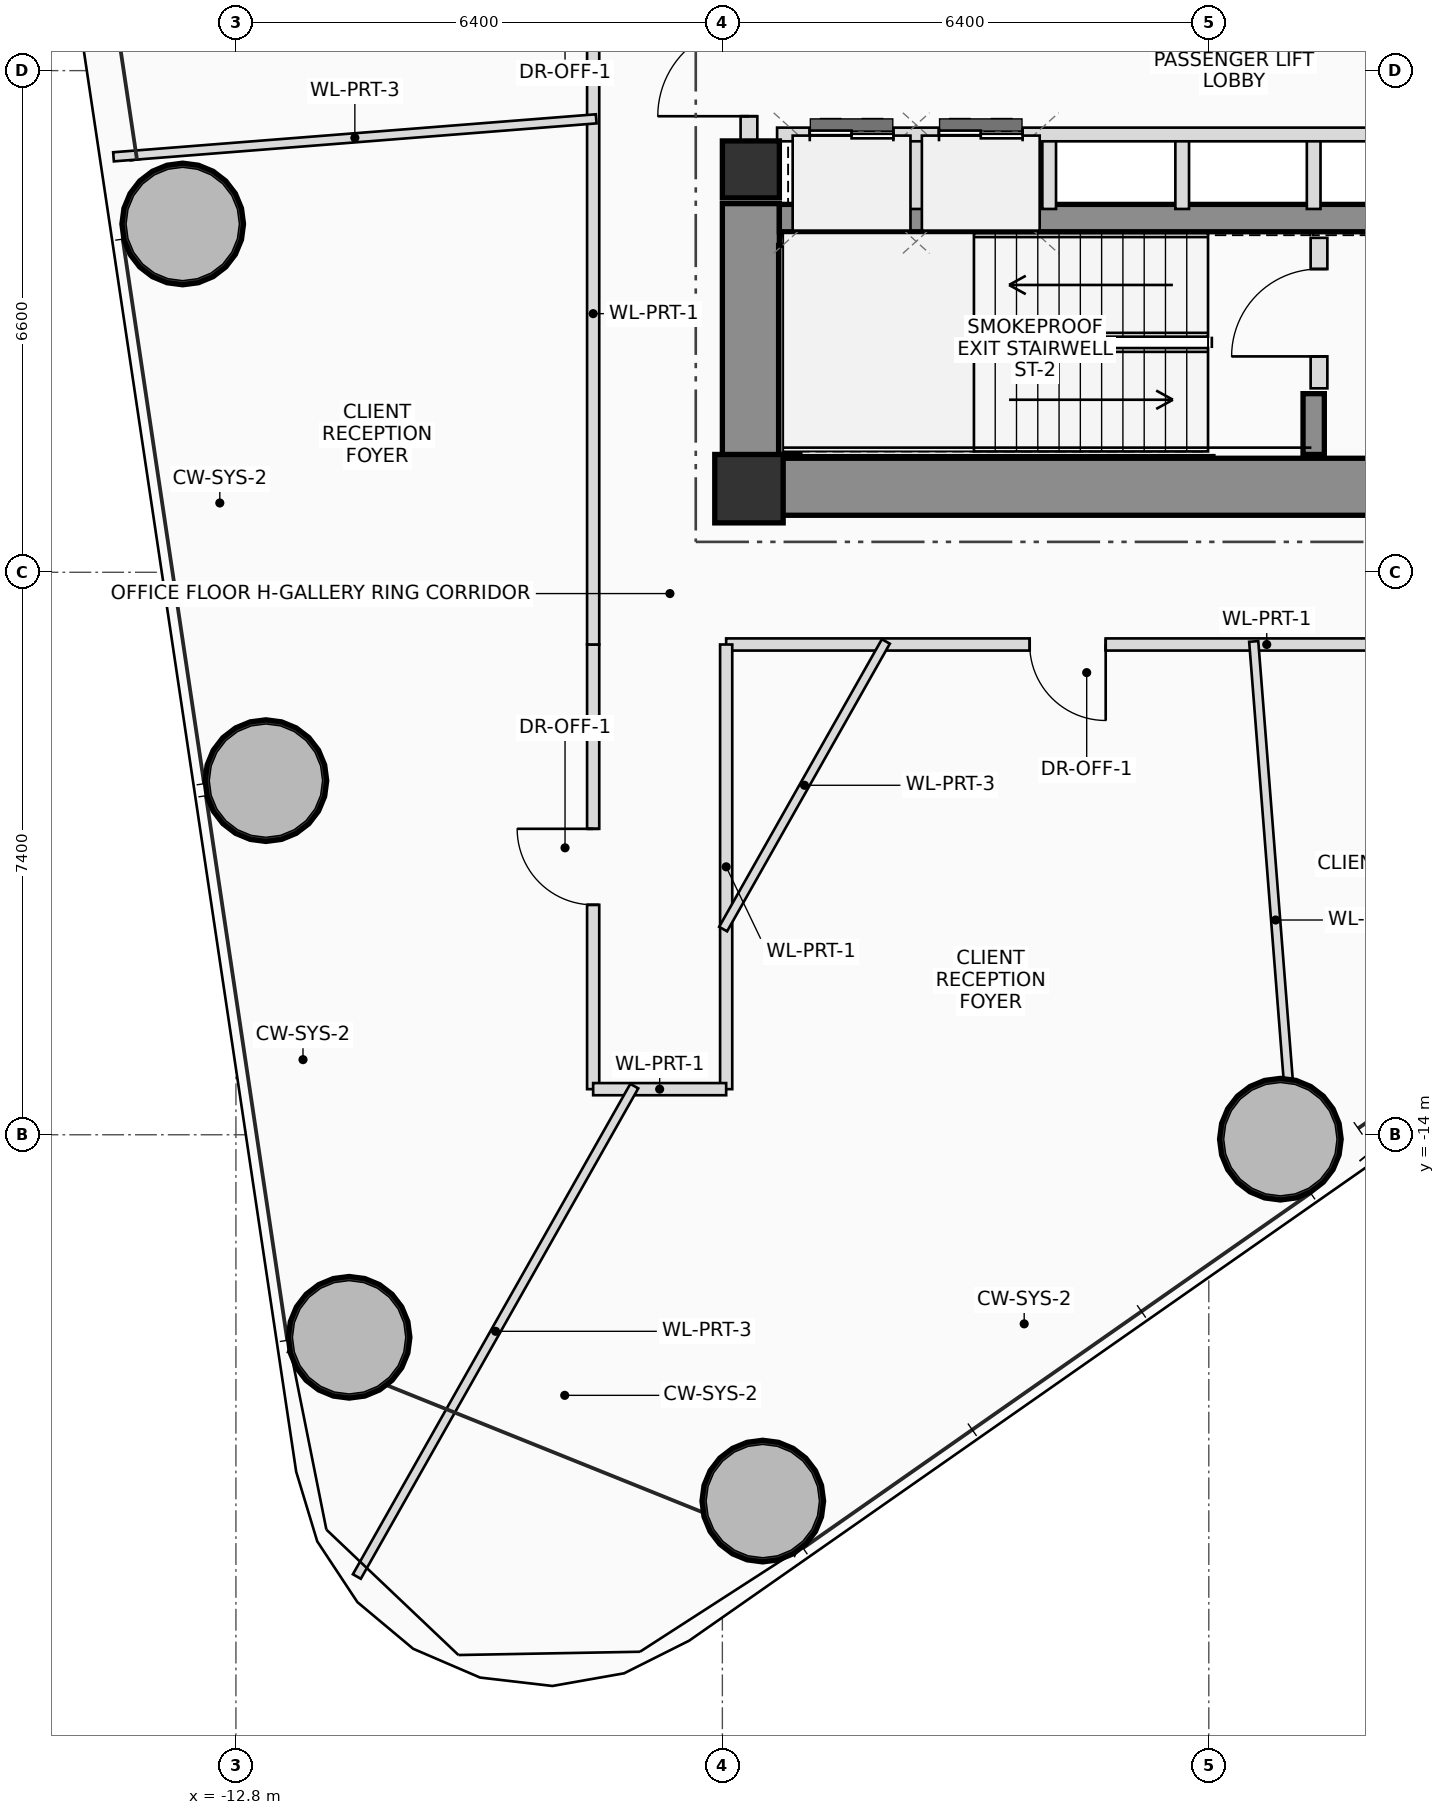
"""IFC4 building model, lengths in metres.
Left out: names, types, materials, properties, quantities, classifications, styles, units other than length and angle.
Written with IfcOpenShell. Run it as: python <this file> out.ifc"""

import sys

from ifc_helpers import new_model, si_unit, direction, frame, frame_2d, origin, origin_2d, place, context, subcontext, project, spatial, rectangle, hollow_circle, extrude, source, transform, mapped, element, fill, save


model = new_model("IFC4")
c1 = context("Model", 3, precision=1e-05, world=origin(), true_north=direction((0.0, 1.0)))
c2 = subcontext(c1, "Body", "Model", "MODEL_VIEW")
j1 = project(units=[si_unit("LENGTHUNIT", "METRE"), si_unit("PLANEANGLEUNIT", "RADIAN")], contexts=[c1])
p1 = place(None, origin())
s1 = spatial("IfcSite", under=j1, at=p1, CompositionType="ELEMENT")
p2 = place(p1, origin())
s2 = spatial("IfcBuilding", under=s1, at=p2, CompositionType="ELEMENT")
p3 = place(p2, frame((0.0, 0.0, 69.8)))
s3 = spatial("IfcBuildingStorey", under=s2, at=p3, CompositionType="ELEMENT", Elevation=69.8)
m1 = source(origin(), c2, "Body", "SweptSolid", [
    extrude(rectangle(XDim=0.9, YDim=0.9, at=origin_2d()), origin(), (0.0, 0.0, 1.0), 3.75),
])
p4 = place(p3, frame((-6.05, -5.5, 0.0), z_axis=(0.0, 0.0, 1.0), x_axis=(1.0, 0.0, 0.0)))
e1 = element("IfcColumn", 1, at=p4, inside=s3, PredefinedType="COLUMN", context=c2, shape_type="MappedRepresentation", body=[
    mapped(m1, transform((0.0, 0.0, 0.0), scale=1.0)),
])
p5 = place(p3, frame((-6.4, -5.475, 0.0), z_axis=(0.0, 0.0, 1.0), x_axis=(1.0, 0.0, 0.0)))
e2 = element("IfcWall", 2, at=p5, inside=s3, PredefinedType="SHEAR", context=c2, shape_type="SweptSolid", body=[
    extrude(rectangle(XDim=12.8, YDim=0.75, at=frame_2d((6.4, 0.0))), origin(), (0.0, 0.0, 1.0), 3.75),
])
p6 = place(p5, frame((8.6, 0.0, 0.0)))
e3 = element("IfcOpeningElement", 3, at=p6, cuts=e2, PredefinedType="OPENING", context=c2, shape_type="SweptSolid", body=[
    extrude(rectangle(XDim=1.2, YDim=2.2, at=frame_2d((0.6, 1.1))), frame((0.0, 0.385, 0.0), z_axis=(0.0, -1.0, 0.0), x_axis=(1.0, 0.0, 0.0)), (0.0, 0.0, 1.0), 0.77),
])
p7 = place(p3, frame((-6.025, -5.1, 0.0), z_axis=(0.0, 0.0, 1.0), x_axis=(0.0, 1.0, 0.0)))
e4 = element("IfcWall", 4, at=p7, inside=s3, PredefinedType="SHEAR", context=c2, shape_type="SweptSolid", body=[
    extrude(rectangle(XDim=3.35, YDim=0.75, at=frame_2d((1.675, 0.0))), origin(), (0.0, 0.0, 1.0), 3.75),
])
p8 = place(p3, frame((-5.65, -1.94, 0.0), z_axis=(0.0, 0.0, 1.0), x_axis=(1.0, 0.0, 0.0)))
e5 = element("IfcWall", 5, at=p8, inside=s3, PredefinedType="SHEAR", context=c2, shape_type="SweptSolid", body=[
    extrude(rectangle(XDim=11.3, YDim=0.36, at=frame_2d((5.65, 0.0))), origin(), (0.0, 0.0, 1.0), 3.75),
])
p9 = place(p3, frame((-5.52, -5.05, 0.0), z_axis=(0.0, 0.0, 1.0), x_axis=(0.0, 1.0, 0.0)))
e6 = element("IfcWall", 6, at=p9, inside=s3, PredefinedType="SHEAR", context=c2, shape_type="SweptSolid", body=[
    extrude(rectangle(XDim=2.75, YDim=0.28, at=frame_2d((1.375, 0.0))), origin(), (0.0, 0.0, 1.0), 3.75),
])
p10 = place(p3, frame((1.38, -5.05, 0.0), z_axis=(0.0, 0.0, 1.0), x_axis=(0.0, 1.0, 0.0)))
e7 = element("IfcWall", 7, at=p10, inside=s3, PredefinedType="SHEAR", context=c2, shape_type="SweptSolid", body=[
    extrude(rectangle(XDim=0.8, YDim=0.28, at=frame_2d((0.4, 0.0))), origin(), (0.0, 0.0, 1.0), 3.75),
])
m2 = source(origin(), c2, "Body", "SweptSolid", [
    extrude(rectangle(XDim=0.75, YDim=0.75, at=origin_2d()), origin(), (0.0, 0.0, 1.0), 3.75),
])
p11 = place(p3, frame((-6.025, -1.3, 0.0), z_axis=(0.0, 0.0, 1.0), x_axis=(1.0, 0.0, 0.0)))
e8 = element("IfcColumn", 8, at=p11, inside=s3, PredefinedType="COLUMN", context=c2, shape_type="MappedRepresentation", body=[
    mapped(m2, transform((0.0, 0.0, 0.0), scale=1.0)),
])
m3 = source(origin(), c2, "Body", "SweptSolid", [
    extrude(hollow_circle(Radius=0.8, WallThickness=0.055, at=origin_2d()), origin(), (0.0, 0.0, 1.0), 3.75),
])
for number, where, z_axis, x_axis in (
    (9, (-5.868, -18.819, 0.0), (0.0, 0.0, 1.0), (1.0, 0.0, 0.0)),
    (10, (0.942, -14.058, 0.0), (0.0, 0.0, 1.0), (1.0, 0.0, 0.0)),
    (11, (-13.5, -2.018, 0.0), (0.0, 0.0, 1.0), (1.0, 0.0, 0.0)),
    (12, (-12.406, -9.341, 0.0), (0.0, 0.0, 1.0), (1.0, 0.0, 0.0)),
    (13, (-11.311, -16.665, 0.0), (0.0, 0.0, 1.0), (1.0, 0.0, 0.0)),
):
    element("IfcColumn", number, at=place(p3, frame(where, z_axis=z_axis, x_axis=x_axis)), inside=s3, PredefinedType="COLUMN", context=c2, shape_type="MappedRepresentation", body=[
        mapped(m3, transform((0.0, 0.0, 0.0), scale=1.0)),
    ])
p12 = place(p3, frame((-6.05, -0.95, 0.0), z_axis=(0.0, 0.0, 1.0), x_axis=(0.0, 1.0, 0.0)))
e14 = element("IfcWall", 14, at=p12, inside=s3, PredefinedType="PLUMBINGWALL", context=c2, shape_type="SweptSolid", body=[
    extrude(rectangle(XDim=1.9, YDim=0.22, at=frame_2d((0.95, 0.0))), origin(), (0.0, 0.0, 1.0), 2.525),
])
p13 = place(p12, frame((0.35, 0.0, 0.0)))
e15 = element("IfcOpeningElement", 15, at=p13, cuts=e14, PredefinedType="OPENING", context=c2, shape_type="SweptSolid", body=[
    extrude(rectangle(XDim=1.2, YDim=2.2, at=frame_2d((0.6, 1.1))), frame((0.0, 0.12, 0.0), z_axis=(0.0, -1.0, 0.0), x_axis=(1.0, 0.0, 0.0)), (0.0, 0.0, 1.0), 0.24),
])
p14 = place(p3, frame((1.45, -4.18, 0.0), z_axis=(0.0, 0.0, 1.0), x_axis=(0.0, 1.0, 0.0)))
e16 = element("IfcWall", 16, at=p14, inside=s3, PredefinedType="PLUMBINGWALL", context=c2, shape_type="SweptSolid", body=[
    extrude(rectangle(XDim=1.98, YDim=0.22, at=frame_2d((0.99, 0.0))), origin(), (0.0, 0.0, 1.0), 3.545),
])
p15 = place(p14, frame((0.42, 0.0, 0.0)))
e17 = element("IfcOpeningElement", 17, at=p15, cuts=e16, PredefinedType="OPENING", context=c2, shape_type="SweptSolid", body=[
    extrude(rectangle(XDim=1.15, YDim=2.15, at=frame_2d((0.575, 1.075))), frame((0.0, 0.12, 0.0), z_axis=(0.0, -1.0, 0.0), x_axis=(1.0, 0.0, 0.0)), (0.0, 0.0, 1.0), 0.24),
])
for number, where, z_axis, x_axis in (
    (18, (-3.85, -1.82, 0.0), (0.0, 0.0, 1.0), (0.0, 1.0, 0.0)),
    (19, (-2.1, -1.82, 0.0), (0.0, 0.0, 1.0), (0.0, 1.0, 0.0)),
    (20, (-0.35, -1.82, 0.0), (0.0, 0.0, 1.0), (0.0, 1.0, 0.0)),
    (21, (1.38, -1.82, 0.0), (0.0, 0.0, 1.0), (0.0, 1.0, 0.0)),
):
    element("IfcWall", number, at=place(p3, frame(where, z_axis=z_axis, x_axis=x_axis)), inside=s3, PredefinedType="PLUMBINGWALL", context=c2, shape_type="SweptSolid", body=[
        extrude(rectangle(XDim=0.98, YDim=0.18, at=frame_2d((0.49, 0.0))), origin(), (0.0, 0.0, 1.0), 3.545),
    ])
p16 = place(p3, frame((-5.68, -0.84, 0.0), z_axis=(0.0, 0.0, 1.0), x_axis=(1.0, 0.0, 0.0)))
e22 = element("IfcWall", 22, at=p16, inside=s3, PredefinedType="PLUMBINGWALL", context=c2, shape_type="SweptSolid", body=[
    extrude(rectangle(XDim=10.22, YDim=0.18, at=frame_2d((5.11, 0.0))), origin(), (0.0, 0.0, 1.0), 3.545),
])
p17 = place(p16, frame((0.43, 0.0, 0.0)))
e23 = element("IfcOpeningElement", 23, at=p17, cuts=e22, PredefinedType="OPENING", context=c2, shape_type="SweptSolid", body=[
    extrude(rectangle(XDim=1.1, YDim=2.2, at=frame_2d((0.55, 1.1))), frame((0.0, 0.1, 0.0), z_axis=(0.0, -1.0, 0.0), x_axis=(1.0, 0.0, 0.0)), (0.0, 0.0, 1.0), 0.2),
])
p18 = place(p16, frame((2.13, 0.0, 0.0)))
e24 = element("IfcOpeningElement", 24, at=p18, cuts=e22, PredefinedType="OPENING", context=c2, shape_type="SweptSolid", body=[
    extrude(rectangle(XDim=1.1, YDim=2.2, at=frame_2d((0.55, 1.1))), frame((0.0, 0.1, 0.0), z_axis=(0.0, -1.0, 0.0), x_axis=(1.0, 0.0, 0.0)), (0.0, 0.0, 1.0), 0.2),
])
p19 = place(p16, frame((9.02, 0.0, 0.0)))
e25 = element("IfcOpeningElement", 25, at=p19, cuts=e22, PredefinedType="OPENING", context=c2, shape_type="SweptSolid", body=[
    extrude(rectangle(XDim=0.9, YDim=2.05, at=frame_2d((0.45, 1.025))), frame((0.0, 0.1, 0.0), z_axis=(0.0, -1.0, 0.0), x_axis=(1.0, 0.0, 0.0)), (0.0, 0.0, 1.0), 0.2),
])
p20 = place(p3, frame((-8.1, -13.4, 0.0), z_axis=(0.0, 0.0, 1.0), x_axis=(0.0, 1.0, 0.0)))
e26 = element("IfcWall", 26, at=p20, inside=s3, PredefinedType="PARTITIONING", context=c2, shape_type="SweptSolid", body=[
    extrude(rectangle(XDim=5.85, YDim=0.16, at=frame_2d((2.925, 0.0))), origin(), (0.0, 0.0, 1.0), 2.85),
])
p21 = place(p20, frame((2.425, 0.0, 0.0)))
e27 = element("IfcOpeningElement", 27, at=p21, cuts=e26, PredefinedType="OPENING", context=c2, shape_type="SweptSolid", body=[
    extrude(rectangle(XDim=1.0, YDim=2.25, at=frame_2d((0.5, 1.125))), frame((0.0, 0.09, 0.0), z_axis=(0.0, -1.0, 0.0), x_axis=(1.0, 0.0, 0.0)), (0.0, 0.0, 1.0), 0.18),
])
p22 = place(p3, frame((-8.1, -7.55, 0.0), z_axis=(0.0, 0.0, 1.0), x_axis=(0.0, 1.0, 0.0)))
e28 = element("IfcWall", 28, at=p22, inside=s3, PredefinedType="PARTITIONING", context=c2, shape_type="SweptSolid", body=[
    extrude(rectangle(XDim=15.1, YDim=0.16, at=frame_2d((7.55, 0.0))), origin(), (0.0, 0.0, 1.0), 2.85),
])
p23 = place(p22, frame((8.855, 0.0, 0.0)))
e29 = element("IfcOpeningElement", 29, at=p23, cuts=e28, PredefinedType="OPENING", context=c2, shape_type="SweptSolid", body=[
    extrude(rectangle(XDim=1.0, YDim=2.25, at=frame_2d((0.5, 1.125))), frame((0.0, 0.09, 0.0), z_axis=(0.0, -1.0, 0.0), x_axis=(1.0, 0.0, 0.0)), (0.0, 0.0, 1.0), 0.18),
])
p24 = place(p22, frame((12.865, 0.0, 0.0)))
e30 = element("IfcOpeningElement", 30, at=p24, cuts=e28, PredefinedType="OPENING", context=c2, shape_type="SweptSolid", body=[
    extrude(rectangle(XDim=1.0, YDim=2.25, at=frame_2d((0.5, 1.125))), frame((0.0, 0.09, 0.0), z_axis=(0.0, -1.0, 0.0), x_axis=(1.0, 0.0, 0.0)), (0.0, 0.0, 1.0), 0.18),
])
p25 = place(p3, frame((6.35, -7.55, 0.0), z_axis=(0.0, 0.0, 1.0), x_axis=(-1.0, 0.0, 0.0)))
e31 = element("IfcWall", 31, at=p25, inside=s3, PredefinedType="PARTITIONING", context=c2, shape_type="SweptSolid", body=[
    extrude(rectangle(XDim=12.7, YDim=0.16, at=frame_2d((6.35, 0.0))), origin(), (0.0, 0.0, 1.0), 2.85),
])
p26 = place(p25, frame((2.469, 0.0, 0.0)))
e32 = element("IfcOpeningElement", 32, at=p26, cuts=e31, PredefinedType="OPENING", context=c2, shape_type="SweptSolid", body=[
    extrude(rectangle(XDim=1.0, YDim=2.25, at=frame_2d((0.5, 1.125))), frame((0.0, 0.09, 0.0), z_axis=(0.0, -1.0, 0.0), x_axis=(1.0, 0.0, 0.0)), (0.0, 0.0, 1.0), 0.18),
])
p27 = place(p25, frame((7.707, 0.0, 0.0)))
e33 = element("IfcOpeningElement", 33, at=p27, cuts=e31, PredefinedType="OPENING", context=c2, shape_type="SweptSolid", body=[
    extrude(rectangle(XDim=1.0, YDim=2.25, at=frame_2d((0.5, 1.125))), frame((0.0, 0.09, 0.0), z_axis=(0.0, -1.0, 0.0), x_axis=(1.0, 0.0, 0.0)), (0.0, 0.0, 1.0), 0.18),
])
p28 = place(p3, frame((-6.35, -7.55, 0.0), z_axis=(0.0, 0.0, 1.0), x_axis=(0.0, -1.0, 0.0)))
e34 = element("IfcWall", 34, at=p28, inside=s3, PredefinedType="PARTITIONING", context=c2, shape_type="SweptSolid", body=[
    extrude(rectangle(XDim=5.85, YDim=0.16, at=frame_2d((2.925, 0.0))), origin(), (0.0, 0.0, 1.0), 3.05),
])
p29 = place(p3, frame((-6.35, -13.4, 0.0), z_axis=(0.0, 0.0, 1.0), x_axis=(-1.0, 0.0, 0.0)))
e35 = element("IfcWall", 35, at=p29, inside=s3, PredefinedType="PARTITIONING", context=c2, shape_type="SweptSolid", body=[
    extrude(rectangle(XDim=1.75, YDim=0.16, at=frame_2d((0.875, 0.0))), origin(), (0.0, 0.0, 1.0), 3.545),
])
p30 = place(p3, frame((-8.06, -0.634, 0.0), z_axis=(0.0, 0.0, 1.0), x_axis=(-0.996917899667, -0.078451904529, 0.0)))
e36 = element("IfcWall", 36, at=p30, inside=s3, PredefinedType="PARTITIONING", context=c2, shape_type="SweptSolid", body=[
    extrude(rectangle(XDim=6.37, YDim=0.12, at=frame_2d((3.185, 0.0))), origin(), (0.0, 0.0, 1.0), 3.01),
])
p31 = place(p3, frame((-4.249, -7.51, 0.0), z_axis=(0.0, 0.0, 1.0), x_axis=(-0.492403224766, -0.870367200807, 0.0)))
e37 = element("IfcWall", 37, at=p31, inside=s3, PredefinedType="PARTITIONING", context=c2, shape_type="SweptSolid", body=[
    extrude(rectangle(XDim=4.348, YDim=0.12, at=frame_2d((2.174, 0.0))), origin(), (0.0, 0.0, 1.0), 2.85),
])
p32 = place(p3, frame((-7.559, -13.36, 0.0), z_axis=(0.0, 0.0, 1.0), x_axis=(-0.492445728691, -0.870343153184, 0.0)))
e38 = element("IfcWall", 38, at=p32, inside=s3, PredefinedType="PARTITIONING", context=c2, shape_type="SweptSolid", body=[
    extrude(rectangle(XDim=7.413, YDim=0.12, at=frame_2d((3.707, 0.0))), origin(), (0.0, 0.0, 1.0), 3.01),
])
p33 = place(p3, frame((0.591, -7.51, 0.0), z_axis=(0.0, 0.0, 1.0), x_axis=(0.078466268921, -0.996916769165, 0.0)))
e39 = element("IfcWall", 39, at=p33, inside=s3, PredefinedType="PARTITIONING", context=c2, shape_type="SweptSolid", body=[
    extrude(rectangle(XDim=7.352, YDim=0.12, at=frame_2d((3.676, 0.0))), origin(), (0.0, 0.0, 1.0), 3.05),
])
p34 = place(p13, origin())
e40 = element("IfcDoor", 40, at=p34, inside=s3, OperationType="SINGLE_SWING_LEFT", PredefinedType="DOOR", context=c2, shape_type="SweptSolid", body=[
    extrude(rectangle(XDim=1.2, YDim=2.2, at=frame_2d((0.6, 1.1))), frame((0.0, 0.025, 0.0), z_axis=(0.0, -1.0, 0.0), x_axis=(1.0, 0.0, 0.0)), (0.0, 0.0, 1.0), 0.05),
])
fill(e15, e40)
p35 = place(p15, origin())
e41 = element("IfcDoor", 41, at=p35, inside=s3, OperationType="SINGLE_SWING_LEFT", PredefinedType="DOOR", context=c2, shape_type="SweptSolid", body=[
    extrude(rectangle(XDim=1.15, YDim=2.15, at=frame_2d((0.575, 1.075))), frame((0.0, 0.025, 0.0), z_axis=(0.0, -1.0, 0.0), x_axis=(1.0, 0.0, 0.0)), (0.0, 0.0, 1.0), 0.05),
])
fill(e17, e41)
p36 = place(p17, origin())
e42 = element("IfcDoor", 42, at=p36, inside=s3, OperationType="DOUBLE_DOOR_SLIDING", PredefinedType="DOOR", context=c2, shape_type="SweptSolid", body=[
    extrude(rectangle(XDim=1.1, YDim=2.2, at=frame_2d((0.55, 1.1))), frame((0.0, 0.025, 0.0), z_axis=(0.0, -1.0, 0.0), x_axis=(1.0, 0.0, 0.0)), (0.0, 0.0, 1.0), 0.05),
])
fill(e23, e42)
p37 = place(p18, origin())
e43 = element("IfcDoor", 43, at=p37, inside=s3, OperationType="DOUBLE_DOOR_SLIDING", PredefinedType="DOOR", context=c2, shape_type="SweptSolid", body=[
    extrude(rectangle(XDim=1.1, YDim=2.2, at=frame_2d((0.55, 1.1))), frame((0.0, 0.025, 0.0), z_axis=(0.0, -1.0, 0.0), x_axis=(1.0, 0.0, 0.0)), (0.0, 0.0, 1.0), 0.05),
])
fill(e24, e43)
p38 = place(p21, origin())
e44 = element("IfcDoor", 44, at=p38, inside=s3, OperationType="SINGLE_SWING_RIGHT", PredefinedType="DOOR", context=c2, shape_type="SweptSolid", body=[
    extrude(rectangle(XDim=1.0, YDim=2.25, at=frame_2d((0.5, 1.125))), frame((0.0, 0.025, 0.0), z_axis=(0.0, -1.0, 0.0), x_axis=(1.0, 0.0, 0.0)), (0.0, 0.0, 1.0), 0.05),
])
fill(e27, e44)
p39 = place(p27, origin())
e45 = element("IfcDoor", 45, at=p39, inside=s3, OperationType="SINGLE_SWING_LEFT", PredefinedType="DOOR", context=c2, shape_type="SweptSolid", body=[
    extrude(rectangle(XDim=1.0, YDim=2.25, at=frame_2d((0.5, 1.125))), frame((0.0, 0.025, 0.0), z_axis=(0.0, -1.0, 0.0), x_axis=(1.0, 0.0, 0.0)), (0.0, 0.0, 1.0), 0.05),
])
fill(e33, e45)
save(model, sys.argv[1])
